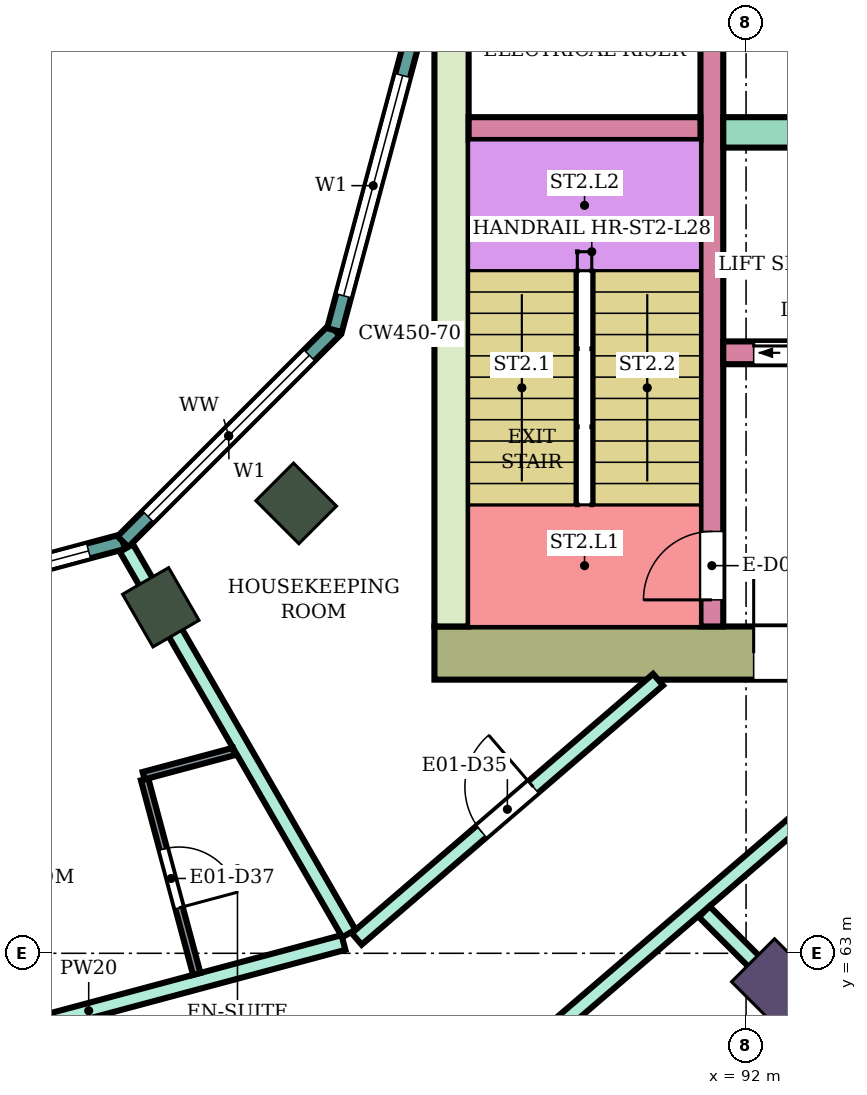
"""IFC4 building model, lengths in metres.
Left out: names, types, materials, properties, quantities, classifications, styles, units other than length and angle.
Written with IfcOpenShell. Run it as: python <this file> out.ifc"""

import sys

from ifc_helpers import new_model, si_unit, direction, frame, frame_2d, origin, origin_2d, place, context, subcontext, project, spatial, rectangle, extrude, element, fill, save


model = new_model("IFC4")
c1 = context("Model", 3, precision=1e-05, world=origin(), true_north=direction((0.0, 1.0)))
c2 = subcontext(c1, "Body", "Model", "MODEL_VIEW")
j1 = project(units=[si_unit("LENGTHUNIT", "METRE"), si_unit("PLANEANGLEUNIT", "RADIAN")], contexts=[c1])
p1 = place(None, origin())
s1 = spatial("IfcSite", under=j1, at=p1, CompositionType="ELEMENT")
p2 = place(p1, origin())
s2 = spatial("IfcBuilding", under=s1, at=p2, CompositionType="ELEMENT")
p3 = place(p2, frame((0.0, 0.0, 122.4)))
s3 = spatial("IfcBuildingStorey", under=s2, at=p3, CompositionType="ELEMENT", Elevation=122.4)
p4 = place(p3, frame((92.445, 62.555, 0.0), z_axis=(0.0, 0.0, 1.0), x_axis=(0.707106781187, -0.707106781187, 0.0)))
e1 = element("IfcColumn", 1, at=p4, inside=s3, PredefinedType="COLUMN", context=c2, shape_type="SweptSolid", body=[
    extrude(rectangle(XDim=1.0, YDim=0.8, at=origin_2d()), origin(), (0.0, 0.0, 1.0), 3.9),
])
for number, where, z_axis, x_axis in (
    (2, (84.3, 67.552, 0.0), (0.0, 0.0, 1.0), (0.5, -0.866, 0.0)),
    (3, (86.081, 68.919, 0.0), (0.0, 0.0, 1.0), (0.707, -0.707, 0.0)),
):
    element("IfcColumn", number, at=place(p3, frame(where, z_axis=z_axis, x_axis=x_axis)), inside=s3, PredefinedType="COLUMN", context=c2, shape_type="SweptSolid", body=[
        extrude(rectangle(XDim=0.8, YDim=0.7, at=origin_2d()), origin(), (0.0, 0.0, 1.0), 3.9),
    ])
p5 = place(p3, frame((87.9, 66.95, 0.0), z_axis=(0.0, 0.0, 1.0), x_axis=(1.0, 0.0, 0.0)))
e4 = element("IfcWall", 4, at=p5, inside=s3, PredefinedType="SHEAR", context=c2, shape_type="SweptSolid", body=[
    extrude(rectangle(XDim=14.8, YDim=0.7, at=frame_2d((7.4, 0.0))), origin(), (0.0, 0.0, 1.0), 3.58),
])
p6 = place(p5, frame((4.2, 0.0, 0.0)))
e5 = element("IfcOpeningElement", 5, at=p6, cuts=e4, PredefinedType="OPENING", context=c2, shape_type="SweptSolid", body=[
    extrude(rectangle(XDim=2.4, YDim=2.4, at=frame_2d((1.2, 1.2))), frame((0.0, 0.36, 0.0), z_axis=(0.0, -1.0, 0.0), x_axis=(1.0, 0.0, 0.0)), (0.0, 0.0, 1.0), 0.72),
])
p7 = place(p3, frame((88.125, 67.3, 0.0), z_axis=(0.0, 0.0, 1.0), x_axis=(0.0, 1.0, 0.0)))
e6 = element("IfcWall", 6, at=p7, inside=s3, PredefinedType="SHEAR", context=c2, shape_type="SweptSolid", body=[
    extrude(rectangle(XDim=7.7, YDim=0.45, at=frame_2d((3.85, 0.0))), origin(), (0.0, 0.0, 1.0), 3.58),
])
p8 = place(p3, frame((91.55, 67.3, 0.0), z_axis=(0.0, 0.0, 1.0), x_axis=(0.0, 1.0, 0.0)))
e7 = element("IfcWall", 7, at=p8, inside=s3, PredefinedType="SHEAR", context=c2, shape_type="SweptSolid", body=[
    extrude(rectangle(XDim=7.7, YDim=0.3, at=frame_2d((3.85, 0.0))), origin(), (0.0, 0.0, 1.0), 3.58),
])
p9 = place(p8, frame((0.35, 0.0, 0.0)))
e8 = element("IfcOpeningElement", 8, at=p9, cuts=e7, PredefinedType="OPENING", context=c2, shape_type="SweptSolid", body=[
    extrude(rectangle(XDim=0.9, YDim=2.1, at=frame_2d((0.45, 1.05))), frame((0.0, 0.16, 0.0), z_axis=(0.0, -1.0, 0.0), x_axis=(1.0, 0.0, 0.0)), (0.0, 0.0, 1.0), 0.32),
])
p10 = place(p3, frame((88.35, 73.85, 0.0), z_axis=(0.0, 0.0, 1.0), x_axis=(1.0, 0.0, 0.0)))
e9 = element("IfcWall", 9, at=p10, inside=s3, PredefinedType="SHEAR", context=c2, shape_type="SweptSolid", body=[
    extrude(rectangle(XDim=3.05, YDim=0.3, at=frame_2d((1.525, 0.0))), origin(), (0.0, 0.0, 1.0), 3.58),
])
p11 = place(p3, frame((91.7, 73.8, 0.0), z_axis=(0.0, 0.0, 1.0), x_axis=(1.0, 0.0, 0.0)))
e10 = element("IfcWall", 10, at=p11, inside=s3, PredefinedType="SHEAR", context=c2, shape_type="SweptSolid", body=[
    extrude(rectangle(XDim=11.0, YDim=0.4, at=frame_2d((5.5, 0.0))), origin(), (0.0, 0.0, 1.0), 3.58),
])
p12 = place(p3, frame((91.7, 70.9, 0.0), z_axis=(0.0, 0.0, 1.0), x_axis=(1.0, 0.0, 0.0)))
e11 = element("IfcWall", 11, at=p12, inside=s3, PredefinedType="SHEAR", context=c2, shape_type="SweptSolid", body=[
    extrude(rectangle(XDim=11.0, YDim=0.3, at=frame_2d((5.5, 0.0))), origin(), (0.0, 0.0, 1.0), 3.58),
])
p13 = place(p12, frame((0.4, 0.0, 0.0)))
e12 = element("IfcOpeningElement", 12, at=p13, cuts=e11, PredefinedType="OPENING", context=c2, shape_type="SweptSolid", body=[
    extrude(rectangle(XDim=1.4, YDim=2.1, at=frame_2d((0.7, 1.05))), frame((0.0, 0.16, 0.0), z_axis=(0.0, -1.0, 0.0), x_axis=(1.0, 0.0, 0.0)), (0.0, 0.0, 1.0), 0.32),
])
p14 = place(p12, frame((5.4, 0.0, 0.0)))
e13 = element("IfcOpeningElement", 13, at=p14, cuts=e11, PredefinedType="OPENING", context=c2, shape_type="SweptSolid", body=[
    extrude(rectangle(XDim=1.4, YDim=2.1, at=frame_2d((0.7, 1.05))), frame((0.0, 0.16, 0.0), z_axis=(0.0, -1.0, 0.0), x_axis=(1.0, 0.0, 0.0)), (0.0, 0.0, 1.0), 0.32),
])
p15 = place(p12, frame((8.1, 0.0, 0.0)))
e14 = element("IfcOpeningElement", 14, at=p15, cuts=e11, PredefinedType="OPENING", context=c2, shape_type="SweptSolid", body=[
    extrude(rectangle(XDim=1.0, YDim=2.1, at=frame_2d((0.5, 1.05))), frame((0.0, 0.16, 0.0), z_axis=(0.0, -1.0, 0.0), x_axis=(1.0, 0.0, 0.0)), (0.0, 0.0, 1.0), 0.32),
])
p16 = place(p3, frame((80.0, 67.396, 0.0), z_axis=(0.0, 0.0, 1.0), x_axis=(0.965933654434, 0.258789828301, 0.0)))
e15 = element("IfcWall", 15, at=p16, inside=s3, PredefinedType="NOTDEFINED", context=c2, shape_type="SweptSolid", body=[
    extrude(rectangle(XDim=3.936, YDim=0.2, at=frame_2d((1.968, 0.0))), origin(), (0.0, 0.0, 1.0), 3.9),
])
p17 = place(p16, frame((0.468, 0.0, 0.9)))
e16 = element("IfcOpeningElement", 16, at=p17, cuts=e15, PredefinedType="OPENING", context=c2, shape_type="SweptSolid", body=[
    extrude(rectangle(XDim=3.0, YDim=2.3, at=frame_2d((1.5, 1.15))), frame((0.0, 0.11, 0.0), z_axis=(0.0, -1.0, 0.0), x_axis=(1.0, 0.0, 0.0)), (0.0, 0.0, 1.0), 0.22),
])
p18 = place(p3, frame((83.802, 68.415, 0.0), z_axis=(0.0, 0.0, 1.0), x_axis=(0.707106781187, 0.707106781187, 0.0)))
e17 = element("IfcWall", 17, at=p18, inside=s3, PredefinedType="NOTDEFINED", context=c2, shape_type="SweptSolid", body=[
    extrude(rectangle(XDim=3.936, YDim=0.2, at=frame_2d((1.968, 0.0))), origin(), (0.0, 0.0, 1.0), 3.9),
])
p19 = place(p18, frame((0.468, 0.0, 0.9)))
e18 = element("IfcOpeningElement", 18, at=p19, cuts=e17, PredefinedType="OPENING", context=c2, shape_type="SweptSolid", body=[
    extrude(rectangle(XDim=3.0, YDim=2.3, at=frame_2d((1.5, 1.15))), frame((0.0, 0.11, 0.0), z_axis=(0.0, -1.0, 0.0), x_axis=(1.0, 0.0, 0.0)), (0.0, 0.0, 1.0), 0.22),
])
p20 = place(p3, frame((86.585, 71.198, 0.0), z_axis=(0.0, 0.0, 1.0), x_axis=(0.258789828301, 0.965933654434, 0.0)))
e19 = element("IfcWall", 19, at=p20, inside=s3, PredefinedType="NOTDEFINED", context=c2, shape_type="SweptSolid", body=[
    extrude(rectangle(XDim=3.936, YDim=0.2, at=frame_2d((1.968, 0.0))), origin(), (0.0, 0.0, 1.0), 3.9),
])
p21 = place(p20, frame((0.468, 0.0, 0.9)))
e20 = element("IfcOpeningElement", 20, at=p21, cuts=e19, PredefinedType="OPENING", context=c2, shape_type="SweptSolid", body=[
    extrude(rectangle(XDim=3.0, YDim=2.3, at=frame_2d((1.5, 1.15))), frame((0.0, 0.11, 0.0), z_axis=(0.0, -1.0, 0.0), x_axis=(1.0, 0.0, 0.0)), (0.0, 0.0, 1.0), 0.22),
])
p22 = place(p3, frame((80.0, 61.346, 0.0), z_axis=(0.0, 0.0, 1.0), x_axis=(0.965924181808, 0.258825182312, 0.0)))
e21 = element("IfcWall", 21, at=p22, inside=s3, PredefinedType="PARTITIONING", context=c2, shape_type="SweptSolid", body=[
    extrude(rectangle(XDim=6.94, YDim=0.2, at=frame_2d((3.47, 0.0))), origin(), (0.0, 0.0, 1.0), 3.45),
])
p23 = place(p22, frame((0.55, 0.0, 0.0)))
e22 = element("IfcOpeningElement", 22, at=p23, cuts=e21, PredefinedType="OPENING", context=c2, shape_type="SweptSolid", body=[
    extrude(rectangle(XDim=1.0, YDim=2.1, at=frame_2d((0.5, 1.05))), frame((0.0, 0.11, 0.0), z_axis=(0.0, -1.0, 0.0), x_axis=(1.0, 0.0, 0.0)), (0.0, 0.0, 1.0), 0.22),
])
p24 = place(p3, frame((83.848, 68.332, 0.0), z_axis=(0.0, 0.0, 1.0), x_axis=(0.499933000352, -0.866064082594, 0.0)))
e23 = element("IfcWall", 23, at=p24, inside=s3, PredefinedType="PARTITIONING", context=c2, shape_type="SweptSolid", body=[
    extrude(rectangle(XDim=5.855, YDim=0.2, at=frame_2d((2.928, 0.0))), origin(), (0.0, 0.0, 1.0), 3.45),
])
p25 = place(p3, frame((86.877, 63.189, 0.0), z_axis=(0.0, 0.0, 1.0), x_axis=(0.758075808328, 0.652166442581, 0.0)))
e24 = element("IfcWall", 24, at=p25, inside=s3, PredefinedType="PARTITIONING", context=c2, shape_type="SweptSolid", body=[
    extrude(rectangle(XDim=5.23, YDim=0.2, at=frame_2d((2.615, 0.0))), origin(), (0.0, 0.0, 1.0), 3.45),
])
p26 = place(p25, frame((2.165, 0.0, 0.0)))
e25 = element("IfcOpeningElement", 25, at=p26, cuts=e24, PredefinedType="OPENING", context=c2, shape_type="SweptSolid", body=[
    extrude(rectangle(XDim=0.9, YDim=2.1, at=frame_2d((0.45, 1.05))), frame((0.0, 0.11, 0.0), z_axis=(0.0, -1.0, 0.0), x_axis=(1.0, 0.0, 0.0)), (0.0, 0.0, 1.0), 0.22),
])
p27 = place(p3, frame((88.235, 60.931, 0.0), z_axis=(0.0, 0.0, 1.0), x_axis=(0.758816241808, 0.651304775945, 0.0)))
e26 = element("IfcWall", 26, at=p27, inside=s3, PredefinedType="PARTITIONING", context=c2, shape_type="SweptSolid", body=[
    extrude(rectangle(XDim=6.186, YDim=0.2, at=frame_2d((3.093, 0.0))), origin(), (0.0, 0.0, 1.0), 3.45),
])
p28 = place(p27, frame((0.308, 0.0, 0.0)))
e27 = element("IfcOpeningElement", 27, at=p28, cuts=e26, PredefinedType="OPENING", context=c2, shape_type="SweptSolid", body=[
    extrude(rectangle(XDim=1.1, YDim=2.1, at=frame_2d((0.55, 1.05))), frame((0.0, 0.11, 0.0), z_axis=(0.0, -1.0, 0.0), x_axis=(1.0, 0.0, 0.0)), (0.0, 0.0, 1.0), 0.22),
])
p29 = place(p3, frame((91.449, 63.548, 0.0), z_axis=(0.0, 0.0, 1.0), x_axis=(0.706984804638, -0.707228736698, 0.0)))
e28 = element("IfcWall", 28, at=p29, inside=s3, PredefinedType="PARTITIONING", context=c2, shape_type="SweptSolid", body=[
    extrude(rectangle(XDim=7.006, YDim=0.2, at=frame_2d((3.503, 0.0))), origin(), (0.0, 0.0, 1.0), 3.45),
])
p30 = place(p3, frame((84.087, 65.289, 0.0), z_axis=(0.0, 0.0, 1.0), x_axis=(0.258929459649, -0.965896234037, 0.0)))
e29 = element("IfcWall", 29, at=p30, inside=s3, PredefinedType="PARTITIONING", context=c2, shape_type="SweptSolid", body=[
    extrude(rectangle(XDim=2.65, YDim=0.1, at=frame_2d((1.325, 0.0))), origin(), (0.0, 0.0, 1.0), 3.45),
])
p31 = place(p30, frame((0.95, 0.0, 0.0)))
e30 = element("IfcOpeningElement", 30, at=p31, cuts=e29, PredefinedType="OPENING", context=c2, shape_type="SweptSolid", body=[
    extrude(rectangle(XDim=0.8, YDim=2.1, at=frame_2d((0.4, 1.05))), frame((0.0, 0.06, 0.0), z_axis=(0.0, -1.0, 0.0), x_axis=(1.0, 0.0, 0.0)), (0.0, 0.0, 1.0), 0.12),
])
p32 = place(p3, frame((84.074, 65.337, 0.0), z_axis=(0.0, 0.0, 1.0), x_axis=(0.965914351064, 0.258861867428, 0.0)))
e31 = element("IfcWall", 31, at=p32, inside=s3, PredefinedType="PARTITIONING", context=c2, shape_type="SweptSolid", body=[
    extrude(rectangle(XDim=1.229, YDim=0.1, at=frame_2d((0.615, 0.0))), origin(), (0.0, 0.0, 1.0), 3.45),
])
p33 = place(p17, origin())
e32 = element("IfcWindow", 32, at=p33, inside=s3, PartitioningType="SINGLE_PANEL", PredefinedType="WINDOW", context=c2, shape_type="SweptSolid", body=[
    extrude(rectangle(XDim=3.0, YDim=2.3, at=frame_2d((1.5, 1.15))), frame((0.0, 0.03, 0.0), z_axis=(0.0, -1.0, 0.0), x_axis=(1.0, 0.0, 0.0)), (0.0, 0.0, 1.0), 0.06),
])
fill(e16, e32)
p34 = place(p19, origin())
e33 = element("IfcWindow", 33, at=p34, inside=s3, PartitioningType="SINGLE_PANEL", PredefinedType="WINDOW", context=c2, shape_type="SweptSolid", body=[
    extrude(rectangle(XDim=3.0, YDim=2.3, at=frame_2d((1.5, 1.15))), frame((0.0, 0.03, 0.0), z_axis=(0.0, -1.0, 0.0), x_axis=(1.0, 0.0, 0.0)), (0.0, 0.0, 1.0), 0.06),
])
fill(e18, e33)
p35 = place(p21, origin())
e34 = element("IfcWindow", 34, at=p35, inside=s3, PartitioningType="SINGLE_PANEL", PredefinedType="WINDOW", context=c2, shape_type="SweptSolid", body=[
    extrude(rectangle(XDim=3.0, YDim=2.3, at=frame_2d((1.5, 1.15))), frame((0.0, 0.03, 0.0), z_axis=(0.0, -1.0, 0.0), x_axis=(1.0, 0.0, 0.0)), (0.0, 0.0, 1.0), 0.06),
])
fill(e20, e34)
p36 = place(p26, origin())
e35 = element("IfcDoor", 35, at=p36, inside=s3, OperationType="SINGLE_SWING_RIGHT", PredefinedType="DOOR", context=c2, shape_type="SweptSolid", body=[
    extrude(rectangle(XDim=0.9, YDim=2.1, at=frame_2d((0.45, 1.05))), frame((0.0, 0.025, 0.0), z_axis=(0.0, -1.0, 0.0), x_axis=(1.0, 0.0, 0.0)), (0.0, 0.0, 1.0), 0.05),
])
fill(e25, e35)
p37 = place(p31, origin())
e36 = element("IfcDoor", 36, at=p37, inside=s3, OperationType="SINGLE_SWING_RIGHT", PredefinedType="DOOR", context=c2, shape_type="SweptSolid", body=[
    extrude(rectangle(XDim=0.8, YDim=2.1, at=frame_2d((0.4, 1.05))), frame((0.0, 0.025, 0.0), z_axis=(0.0, -1.0, 0.0), x_axis=(1.0, 0.0, 0.0)), (0.0, 0.0, 1.0), 0.05),
])
fill(e30, e36)
p38 = place(p9, origin())
e37 = element("IfcDoor", 37, at=p38, inside=s3, OperationType="SINGLE_SWING_LEFT", PredefinedType="DOOR", context=c2, shape_type="SweptSolid", body=[
    extrude(rectangle(XDim=0.9, YDim=2.1, at=frame_2d((0.45, 1.05))), frame((0.0, 0.025, 0.0), z_axis=(0.0, -1.0, 0.0), x_axis=(1.0, 0.0, 0.0)), (0.0, 0.0, 1.0), 0.05),
])
fill(e8, e37)
p39 = place(p13, origin())
e38 = element("IfcDoor", 38, at=p39, inside=s3, OperationType="DOUBLE_DOOR_SLIDING", PredefinedType="DOOR", context=c2, shape_type="SweptSolid", body=[
    extrude(rectangle(XDim=1.4, YDim=2.1, at=frame_2d((0.7, 1.05))), frame((0.0, 0.025, 0.0), z_axis=(0.0, -1.0, 0.0), x_axis=(1.0, 0.0, 0.0)), (0.0, 0.0, 1.0), 0.05),
])
fill(e12, e38)
p40 = place(p6, origin())
e39 = element("IfcDoor", 39, at=p40, inside=s3, OperationType="DOUBLE_DOOR_SINGLE_SWING", PredefinedType="DOOR", context=c2, shape_type="SweptSolid", body=[
    extrude(rectangle(XDim=2.4, YDim=2.4, at=frame_2d((1.2, 1.2))), frame((0.0, 0.025, 0.0), z_axis=(0.0, -1.0, 0.0), x_axis=(1.0, 0.0, 0.0)), (0.0, 0.0, 1.0), 0.05),
])
fill(e5, e39)
save(model, sys.argv[1])
